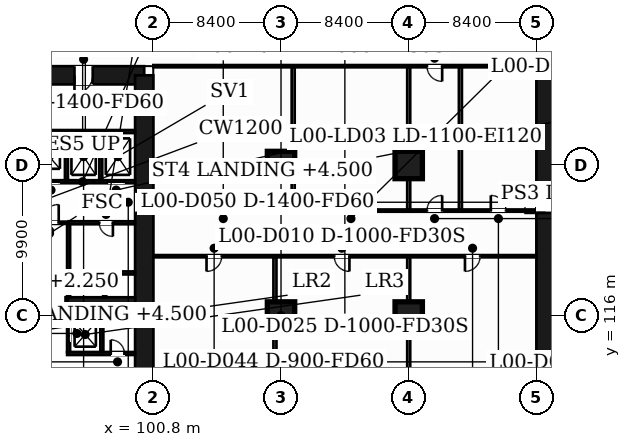
"""IFC4 building model, lengths in metres.
Left out: names, types, materials, properties, quantities, classifications, styles, units other than length and angle.
Written with IfcOpenShell. Run it as: python <this file> out.ifc"""

import sys

from ifc_helpers import new_model, si_unit, direction, frame, frame_2d, origin, origin_2d, place, context, subcontext, project, spatial, rectangle, extrude, element, fill, save


model = new_model("IFC4")
c1 = context("Model", 3, precision=1e-05, world=origin(), true_north=direction((0.0, 1.0)))
c2 = subcontext(c1, "Body", "Model", "MODEL_VIEW")
j1 = project(units=[si_unit("LENGTHUNIT", "METRE"), si_unit("PLANEANGLEUNIT", "RADIAN")], contexts=[c1])
p1 = place(None, origin())
s1 = spatial("IfcSite", under=j1, at=p1, CompositionType="ELEMENT")
p2 = place(p1, origin())
s2 = spatial("IfcBuilding", under=s1, at=p2, CompositionType="ELEMENT")
p3 = place(p2, origin())
s3 = spatial("IfcBuildingStorey", under=s2, at=p3, CompositionType="ELEMENT", Elevation=0.0)
p4 = place(p3, frame((89.156, 131.8, -0.35), z_axis=(0.0, 0.0, 1.0), x_axis=(1.0, 0.0, 0.0)))
e1 = element("IfcWall", 1, at=p4, inside=s3, PredefinedType="SHEAR", context=c2, shape_type="SweptSolid", body=[
    extrude(rectangle(XDim=11.044, YDim=1.2, at=frame_2d((5.522, 0.0))), origin(), (0.0, 0.0, 1.0), 9.35),
])
p5 = place(p4, frame((6.458, 0.0, 0.35)))
e2 = element("IfcOpeningElement", 2, at=p5, cuts=e1, PredefinedType="OPENING", context=c2, shape_type="SweptSolid", body=[
    extrude(rectangle(XDim=1.2, YDim=2.1, at=frame_2d((0.6, 1.05))), frame((0.0, 0.61, 0.0), z_axis=(0.0, -1.0, 0.0), x_axis=(1.0, 0.0, 0.0)), (0.0, 0.0, 1.0), 1.22),
])
p6 = place(p3, frame((100.2, 131.8, -0.35), z_axis=(0.0, 0.0, 1.0), x_axis=(0.0, -1.0, 0.0)))
e3 = element("IfcWall", 3, at=p6, inside=s3, PredefinedType="SHEAR", context=c2, shape_type="SweptSolid", body=[
    extrude(rectangle(XDim=20.8, YDim=1.2, at=frame_2d((10.4, 0.0))), origin(), (0.0, 0.0, 1.0), 9.35),
])
p7 = place(p6, frame((7.65, 0.0, 0.35)))
e4 = element("IfcOpeningElement", 4, at=p7, cuts=e3, PredefinedType="OPENING", context=c2, shape_type="SweptSolid", body=[
    extrude(rectangle(XDim=1.4, YDim=2.1, at=frame_2d((0.7, 1.05))), frame((0.0, 0.61, 0.0), z_axis=(0.0, -1.0, 0.0), x_axis=(1.0, 0.0, 0.0)), (0.0, 0.0, 1.0), 1.22),
])
p8 = place(p3, frame((95.1, 116.6, -0.35), z_axis=(0.0, 0.0, 1.0), x_axis=(1.0, 0.0, 0.0)))
e5 = element("IfcWall", 5, at=p8, inside=s3, PredefinedType="SHEAR", context=c2, shape_type="SweptSolid", body=[
    extrude(rectangle(XDim=4.5, YDim=1.2, at=frame_2d((2.25, 0.0))), origin(), (0.0, 0.0, 1.0), 9.35),
])
p9 = place(p3, frame((126.6, 131.8, -0.35), z_axis=(0.0, 0.0, 1.0), x_axis=(1.0, 0.0, 0.0)))
e6 = element("IfcWall", 6, at=p9, inside=s3, PredefinedType="SHEAR", context=c2, shape_type="SweptSolid", body=[
    extrude(rectangle(XDim=11.044, YDim=1.2, at=frame_2d((5.522, 0.0))), origin(), (0.0, 0.0, 1.0), 9.35),
])
p10 = place(p9, frame((3.386, 0.0, 0.35)))
e7 = element("IfcOpeningElement", 7, at=p10, cuts=e6, PredefinedType="OPENING", context=c2, shape_type="SweptSolid", body=[
    extrude(rectangle(XDim=1.2, YDim=2.1, at=frame_2d((0.6, 1.05))), frame((0.0, 0.61, 0.0), z_axis=(0.0, -1.0, 0.0), x_axis=(1.0, 0.0, 0.0)), (0.0, 0.0, 1.0), 1.22),
])
p11 = place(p3, frame((126.6, 111.0, -0.35), z_axis=(0.0, 0.0, 1.0), x_axis=(0.0, 1.0, 0.0)))
e8 = element("IfcWall", 8, at=p11, inside=s3, PredefinedType="SHEAR", context=c2, shape_type="SweptSolid", body=[
    extrude(rectangle(XDim=20.8, YDim=1.2, at=frame_2d((10.4, 0.0))), origin(), (0.0, 0.0, 1.0), 9.35),
])
p12 = place(p11, frame((11.75, 0.0, 0.35)))
e9 = element("IfcOpeningElement", 9, at=p12, cuts=e8, PredefinedType="OPENING", context=c2, shape_type="SweptSolid", body=[
    extrude(rectangle(XDim=1.4, YDim=2.1, at=frame_2d((0.7, 1.05))), frame((0.0, 0.61, 0.0), z_axis=(0.0, -1.0, 0.0), x_axis=(1.0, 0.0, 0.0)), (0.0, 0.0, 1.0), 1.22),
])
for number, where, z_axis, x_axis in (
    (10, (109.2, 116.0, -0.35), (0.0, 0.0, 1.0), (1.0, 0.0, 0.0)),
    (11, (117.6, 116.0, -0.35), (0.0, 0.0, 1.0), (1.0, 0.0, 0.0)),
    (12, (109.2, 125.9, -0.35), (0.0, 0.0, 1.0), (1.0, 0.0, 0.0)),
    (13, (117.6, 125.9, -0.35), (0.0, 0.0, 1.0), (1.0, 0.0, 0.0)),
):
    element("IfcColumn", number, at=place(p3, frame(where, z_axis=z_axis, x_axis=x_axis)), inside=s3, PredefinedType="COLUMN", context=c2, shape_type="SweptSolid", body=[
        extrude(rectangle(XDim=1.8, YDim=1.8, at=origin_2d()), origin(), (0.0, 0.0, 1.0), 9.35),
    ])
p13 = place(p3, frame((95.127, 113.5, 0.0), z_axis=(0.0, 0.0, 1.0), x_axis=(1.0, 0.0, 0.0)))
e14 = element("IfcWall", 14, at=p13, inside=s3, PredefinedType="PARTITIONING", context=c2, shape_type="SweptSolid", body=[
    extrude(rectangle(XDim=4.473, YDim=0.2, at=frame_2d((2.237, 0.0))), origin(), (0.0, 0.0, 1.0), 8.5),
])
p14 = place(p13, frame((2.871, 0.0, 0.0)))
e15 = element("IfcOpeningElement", 15, at=p14, cuts=e14, PredefinedType="OPENING", context=c2, shape_type="SweptSolid", body=[
    extrude(rectangle(XDim=0.9, YDim=2.1, at=frame_2d((0.45, 1.05))), frame((0.0, 0.11, 0.0), z_axis=(0.0, -1.0, 0.0), x_axis=(1.0, 0.0, 0.0)), (0.0, 0.0, 1.0), 0.22),
])
p15 = place(p3, frame((95.227, 118.8, 0.0), z_axis=(0.0, 0.0, 1.0), x_axis=(1.0, 0.0, 0.0)))
e16 = element("IfcWall", 16, at=p15, inside=s3, PredefinedType="PARTITIONING", context=c2, shape_type="SweptSolid", body=[
    extrude(rectangle(XDim=4.373, YDim=0.2, at=frame_2d((2.187, 0.0))), origin(), (0.0, 0.0, 1.0), 8.5),
])
p16 = place(p3, frame((100.8, 119.9, 0.0), z_axis=(0.0, 0.0, 1.0), x_axis=(1.0, 0.0, 0.0)))
e17 = element("IfcWall", 17, at=p16, inside=s3, PredefinedType="PARTITIONING", context=c2, shape_type="SweptSolid", body=[
    extrude(rectangle(XDim=25.2, YDim=0.15, at=frame_2d((12.6, 0.0))), origin(), (0.0, 0.0, 1.0), 8.5),
])
p17 = place(p16, frame((3.5, 0.0, 0.0)))
e18 = element("IfcOpeningElement", 18, at=p17, cuts=e17, PredefinedType="OPENING", context=c2, shape_type="SweptSolid", body=[
    extrude(rectangle(XDim=1.0, YDim=2.1, at=frame_2d((0.5, 1.05))), frame((0.0, 0.085, 0.0), z_axis=(0.0, -1.0, 0.0), x_axis=(1.0, 0.0, 0.0)), (0.0, 0.0, 1.0), 0.17),
])
p18 = place(p16, frame((11.9, 0.0, 0.0)))
e19 = element("IfcOpeningElement", 19, at=p18, cuts=e17, PredefinedType="OPENING", context=c2, shape_type="SweptSolid", body=[
    extrude(rectangle(XDim=1.0, YDim=2.1, at=frame_2d((0.5, 1.05))), frame((0.0, 0.085, 0.0), z_axis=(0.0, -1.0, 0.0), x_axis=(1.0, 0.0, 0.0)), (0.0, 0.0, 1.0), 0.17),
])
p19 = place(p16, frame((20.5, 0.0, 0.0)))
e20 = element("IfcOpeningElement", 20, at=p19, cuts=e17, PredefinedType="OPENING", context=c2, shape_type="SweptSolid", body=[
    extrude(rectangle(XDim=1.0, YDim=2.1, at=frame_2d((0.5, 1.05))), frame((0.0, 0.085, 0.0), z_axis=(0.0, -1.0, 0.0), x_axis=(1.0, 0.0, 0.0)), (0.0, 0.0, 1.0), 0.17),
])
p20 = place(p3, frame((95.227, 122.1, 0.0), z_axis=(0.0, 0.0, 1.0), x_axis=(1.0, 0.0, 0.0)))
e21 = element("IfcWall", 21, at=p20, inside=s3, PredefinedType="PARTITIONING", context=c2, shape_type="SweptSolid", body=[
    extrude(rectangle(XDim=4.373, YDim=0.2, at=frame_2d((2.187, 0.0))), origin(), (0.0, 0.0, 1.0), 8.5),
])
p21 = place(p20, frame((2.014, 0.0, 0.0)))
e22 = element("IfcOpeningElement", 22, at=p21, cuts=e21, PredefinedType="OPENING", context=c2, shape_type="SweptSolid", body=[
    extrude(rectangle(XDim=0.9, YDim=2.1, at=frame_2d((0.45, 1.05))), frame((0.0, 0.11, 0.0), z_axis=(0.0, -1.0, 0.0), x_axis=(1.0, 0.0, 0.0)), (0.0, 0.0, 1.0), 0.22),
])
p22 = place(p3, frame((92.827, 122.1, 0.0), z_axis=(0.0, 0.0, 1.0), x_axis=(1.0, 0.0, 0.0)))
e23 = element("IfcWall", 23, at=p22, inside=s3, PredefinedType="PARTITIONING", context=c2, shape_type="SweptSolid", body=[
    extrude(rectangle(XDim=2.4, YDim=0.15, at=frame_2d((1.2, 0.0))), origin(), (0.0, 0.0, 1.0), 8.5),
])
p23 = place(p22, frame((0.55, 0.0, 0.0)))
e24 = element("IfcOpeningElement", 24, at=p23, cuts=e23, PredefinedType="OPENING", context=c2, shape_type="SweptSolid", body=[
    extrude(rectangle(XDim=1.2, YDim=2.1, at=frame_2d((0.6, 1.05))), frame((0.0, 0.085, 0.0), z_axis=(0.0, -1.0, 0.0), x_axis=(1.0, 0.0, 0.0)), (0.0, 0.0, 1.0), 0.17),
])
p24 = place(p3, frame((100.8, 122.9, 0.0), z_axis=(0.0, 0.0, 1.0), x_axis=(1.0, 0.0, 0.0)))
e25 = element("IfcWall", 25, at=p24, inside=s3, PredefinedType="PARTITIONING", context=c2, shape_type="SweptSolid", body=[
    extrude(rectangle(XDim=25.2, YDim=0.15, at=frame_2d((12.6, 0.0))), origin(), (0.0, 0.0, 1.0), 8.5),
])
p25 = place(p24, frame((4.1, 0.0, 0.0)))
e26 = element("IfcOpeningElement", 26, at=p25, cuts=e25, PredefinedType="OPENING", context=c2, shape_type="SweptSolid", body=[
    extrude(rectangle(XDim=1.0, YDim=2.1, at=frame_2d((0.5, 1.05))), frame((0.0, 0.085, 0.0), z_axis=(0.0, -1.0, 0.0), x_axis=(1.0, 0.0, 0.0)), (0.0, 0.0, 1.0), 0.17),
])
p26 = place(p24, frame((12.5, 0.0, 0.0)))
e27 = element("IfcOpeningElement", 27, at=p26, cuts=e25, PredefinedType="OPENING", context=c2, shape_type="SweptSolid", body=[
    extrude(rectangle(XDim=1.0, YDim=2.1, at=frame_2d((0.5, 1.05))), frame((0.0, 0.085, 0.0), z_axis=(0.0, -1.0, 0.0), x_axis=(1.0, 0.0, 0.0)), (0.0, 0.0, 1.0), 0.17),
])
p27 = place(p24, frame((18.0, 0.0, 0.0)))
e28 = element("IfcOpeningElement", 28, at=p27, cuts=e25, PredefinedType="OPENING", context=c2, shape_type="SweptSolid", body=[
    extrude(rectangle(XDim=1.0, YDim=2.1, at=frame_2d((0.5, 1.05))), frame((0.0, 0.085, 0.0), z_axis=(0.0, -1.0, 0.0), x_axis=(1.0, 0.0, 0.0)), (0.0, 0.0, 1.0), 0.17),
])
p28 = place(p24, frame((22.2, 0.0, 0.0)))
e29 = element("IfcOpeningElement", 29, at=p28, cuts=e25, PredefinedType="OPENING", context=c2, shape_type="SweptSolid", body=[
    extrude(rectangle(XDim=1.0, YDim=2.1, at=frame_2d((0.5, 1.05))), frame((0.0, 0.085, 0.0), z_axis=(0.0, -1.0, 0.0), x_axis=(1.0, 0.0, 0.0)), (0.0, 0.0, 1.0), 0.17),
])
p29 = place(p3, frame((92.702, 124.8, 0.0), z_axis=(0.0, 0.0, 1.0), x_axis=(1.0, 0.0, 0.0)))
e30 = element("IfcWall", 30, at=p29, inside=s3, PredefinedType="PARTITIONING", context=c2, shape_type="SweptSolid", body=[
    extrude(rectangle(XDim=6.898, YDim=0.2, at=frame_2d((3.449, 0.0))), origin(), (0.0, 0.0, 1.0), 8.5),
])
p30 = place(p29, frame((0.818, 0.0, 0.0)))
e31 = element("IfcOpeningElement", 31, at=p30, cuts=e30, PredefinedType="OPENING", context=c2, shape_type="SweptSolid", body=[
    extrude(rectangle(XDim=1.1, YDim=2.1, at=frame_2d((0.55, 1.05))), frame((0.0, 0.11, 0.0), z_axis=(0.0, -1.0, 0.0), x_axis=(1.0, 0.0, 0.0)), (0.0, 0.0, 1.0), 0.22),
])
p31 = place(p29, frame((5.105, 0.0, 0.0)))
e32 = element("IfcOpeningElement", 32, at=p31, cuts=e30, PredefinedType="OPENING", context=c2, shape_type="SweptSolid", body=[
    extrude(rectangle(XDim=1.1, YDim=2.1, at=frame_2d((0.55, 1.05))), frame((0.0, 0.11, 0.0), z_axis=(0.0, -1.0, 0.0), x_axis=(1.0, 0.0, 0.0)), (0.0, 0.0, 1.0), 0.22),
])
p32 = place(p3, frame((117.6, 127.9, 0.0), z_axis=(0.0, 0.0, 1.0), x_axis=(1.0, 0.0, 0.0)))
e33 = element("IfcWall", 33, at=p32, inside=s3, PredefinedType="PARTITIONING", context=c2, shape_type="SweptSolid", body=[
    extrude(rectangle(XDim=3.4, YDim=0.2, at=frame_2d((1.7, 0.0))), origin(), (0.0, 0.0, 1.0), 8.5),
])
p33 = place(p3, frame((92.827, 128.1, 0.0), z_axis=(0.0, 0.0, 1.0), x_axis=(1.0, 0.0, 0.0)))
e34 = element("IfcWall", 34, at=p33, inside=s3, PredefinedType="PARTITIONING", context=c2, shape_type="SweptSolid", body=[
    extrude(rectangle(XDim=6.773, YDim=0.2, at=frame_2d((3.387, 0.0))), origin(), (0.0, 0.0, 1.0), 8.5),
])
p34 = place(p33, frame((2.951, 0.0, 0.0)))
e35 = element("IfcOpeningElement", 35, at=p34, cuts=e34, PredefinedType="OPENING", context=c2, shape_type="SweptSolid", body=[
    extrude(rectangle(XDim=1.1, YDim=2.1, at=frame_2d((0.55, 1.05))), frame((0.0, 0.11, 0.0), z_axis=(0.0, -1.0, 0.0), x_axis=(1.0, 0.0, 0.0)), (0.0, 0.0, 1.0), 0.22),
])
p35 = place(p3, frame((100.8, 132.4, 0.0), z_axis=(0.0, 0.0, 1.0), x_axis=(1.0, 0.0, 0.0)))
e36 = element("IfcWall", 36, at=p35, inside=s3, PredefinedType="PARTITIONING", context=c2, shape_type="SweptSolid", body=[
    extrude(rectangle(XDim=25.2, YDim=0.15, at=frame_2d((12.6, 0.0))), origin(), (0.0, 0.0, 1.0), 8.5),
])
p36 = place(p35, frame((18.0, 0.0, 0.0)))
e37 = element("IfcOpeningElement", 37, at=p36, cuts=e36, PredefinedType="OPENING", context=c2, shape_type="SweptSolid", body=[
    extrude(rectangle(XDim=1.0, YDim=2.1, at=frame_2d((0.5, 1.05))), frame((0.0, 0.085, 0.0), z_axis=(0.0, -1.0, 0.0), x_axis=(1.0, 0.0, 0.0)), (0.0, 0.0, 1.0), 0.17),
])
p37 = place(p3, frame((95.085, 124.9, 0.0), z_axis=(0.0, 0.0, 1.0), x_axis=(0.0, 1.0, 0.0)))
e38 = element("IfcWall", 38, at=p37, inside=s3, PredefinedType="PARTITIONING", context=c2, shape_type="SweptSolid", body=[
    extrude(rectangle(XDim=3.1, YDim=0.2, at=frame_2d((1.55, 0.0))), origin(), (0.0, 0.0, 1.0), 8.5),
])
p38 = place(p3, frame((95.1, 116.0, 0.0), z_axis=(0.0, 0.0, 1.0), x_axis=(0.0, 1.0, 0.0)))
e39 = element("IfcWall", 39, at=p38, inside=s3, PredefinedType="PARTITIONING", context=c2, shape_type="SweptSolid", body=[
    extrude(rectangle(XDim=1.2, YDim=0.15, at=frame_2d((0.6, 0.0))), origin(), (0.0, 0.0, 1.0), 8.5),
])
p39 = place(p3, frame((95.227, 113.6, 0.0), z_axis=(0.0, 0.0, 1.0), x_axis=(0.0, 1.0, 0.0)))
e40 = element("IfcWall", 40, at=p39, inside=s3, PredefinedType="PARTITIONING", context=c2, shape_type="SweptSolid", body=[
    extrude(rectangle(XDim=2.4, YDim=0.2, at=frame_2d((1.2, 0.0))), origin(), (0.0, 0.0, 1.0), 8.5),
])
p40 = place(p39, frame((0.67, 0.0, 0.0)))
e41 = element("IfcOpeningElement", 41, at=p40, cuts=e40, PredefinedType="OPENING", context=c2, shape_type="SweptSolid", body=[
    extrude(rectangle(XDim=1.1, YDim=2.1, at=frame_2d((0.55, 1.05))), frame((0.0, 0.11, 0.0), z_axis=(0.0, -1.0, 0.0), x_axis=(1.0, 0.0, 0.0)), (0.0, 0.0, 1.0), 0.22),
])
p41 = place(p3, frame((95.227, 117.2, 0.0), z_axis=(0.0, 0.0, 1.0), x_axis=(0.0, 1.0, 0.0)))
e42 = element("IfcWall", 42, at=p41, inside=s3, PredefinedType="PARTITIONING", context=c2, shape_type="SweptSolid", body=[
    extrude(rectangle(XDim=4.8, YDim=0.2, at=frame_2d((2.4, 0.0))), origin(), (0.0, 0.0, 1.0), 8.5),
])
p42 = place(p41, frame((0.35, 0.0, 0.0)))
e43 = element("IfcOpeningElement", 43, at=p42, cuts=e42, PredefinedType="OPENING", context=c2, shape_type="SweptSolid", body=[
    extrude(rectangle(XDim=0.9, YDim=2.1, at=frame_2d((0.45, 1.05))), frame((0.0, 0.11, 0.0), z_axis=(0.0, -1.0, 0.0), x_axis=(1.0, 0.0, 0.0)), (0.0, 0.0, 1.0), 0.22),
])
p43 = place(p3, frame((97.342, 124.9, 0.0), z_axis=(0.0, 0.0, 1.0), x_axis=(0.0, 1.0, 0.0)))
e44 = element("IfcWall", 44, at=p43, inside=s3, PredefinedType="PARTITIONING", context=c2, shape_type="SweptSolid", body=[
    extrude(rectangle(XDim=3.1, YDim=0.2, at=frame_2d((1.55, 0.0))), origin(), (0.0, 0.0, 1.0), 8.5),
])
p44 = place(p3, frame((97.414, 113.6, 0.0), z_axis=(0.0, 0.0, 1.0), x_axis=(0.0, 1.0, 0.0)))
e45 = element("IfcWall", 45, at=p44, inside=s3, PredefinedType="PARTITIONING", context=c2, shape_type="SweptSolid", body=[
    extrude(rectangle(XDim=2.4, YDim=0.2, at=frame_2d((1.2, 0.0))), origin(), (0.0, 0.0, 1.0), 8.5),
])
p45 = place(p3, frame((97.6, 117.2, 0.0), z_axis=(0.0, 0.0, 1.0), x_axis=(0.0, 1.0, 0.0)))
e46 = element("IfcWall", 46, at=p45, inside=s3, PredefinedType="PARTITIONING", context=c2, shape_type="SweptSolid", body=[
    extrude(rectangle(XDim=1.5, YDim=0.2, at=frame_2d((0.75, 0.0))), origin(), (0.0, 0.0, 1.0), 8.5),
])
for number, where, z_axis, x_axis in (
    (47, (108.8, 110.475, 0.0), (0.0, 0.0, 1.0), (0.0, 1.0, 0.0)),
    (48, (110.0, 122.975, 0.0), (0.0, 0.0, 1.0), (0.0, 1.0, 0.0)),
    (49, (117.6, 110.475, 0.0), (0.0, 0.0, 1.0), (0.0, 1.0, 0.0)),
    (50, (117.6, 122.975, 0.0), (0.0, 0.0, 1.0), (0.0, 1.0, 0.0)),
    (51, (121.0, 122.975, 0.0), (0.0, 0.0, 1.0), (0.0, 1.0, 0.0)),
):
    element("IfcWall", number, at=place(p3, frame(where, z_axis=z_axis, x_axis=x_axis)), inside=s3, PredefinedType="PARTITIONING", context=c2, shape_type="SweptSolid", body=[
        extrude(rectangle(XDim=9.35, YDim=0.2, at=frame_2d((4.675, 0.0))), origin(), (0.0, 0.0, 1.0), 8.5),
    ])
p46 = place(p17, origin())
e52 = element("IfcDoor", 52, at=p46, inside=s3, OperationType="SINGLE_SWING_LEFT", PredefinedType="DOOR", context=c2, shape_type="SweptSolid", body=[
    extrude(rectangle(XDim=1.0, YDim=2.1, at=frame_2d((0.5, 1.05))), frame((0.0, 0.025, 0.0), z_axis=(0.0, -1.0, 0.0), x_axis=(1.0, 0.0, 0.0)), (0.0, 0.0, 1.0), 0.05),
])
fill(e18, e52)
p47 = place(p18, origin())
e53 = element("IfcDoor", 53, at=p47, inside=s3, OperationType="SINGLE_SWING_RIGHT", PredefinedType="DOOR", context=c2, shape_type="SweptSolid", body=[
    extrude(rectangle(XDim=1.0, YDim=2.1, at=frame_2d((0.5, 1.05))), frame((0.0, 0.025, 0.0), z_axis=(0.0, -1.0, 0.0), x_axis=(1.0, 0.0, 0.0)), (0.0, 0.0, 1.0), 0.05),
])
fill(e19, e53)
p48 = place(p19, origin())
e54 = element("IfcDoor", 54, at=p48, inside=s3, OperationType="SINGLE_SWING_LEFT", PredefinedType="DOOR", context=c2, shape_type="SweptSolid", body=[
    extrude(rectangle(XDim=1.0, YDim=2.1, at=frame_2d((0.5, 1.05))), frame((0.0, 0.025, 0.0), z_axis=(0.0, -1.0, 0.0), x_axis=(1.0, 0.0, 0.0)), (0.0, 0.0, 1.0), 0.05),
])
fill(e20, e54)
p49 = place(p25, origin())
e55 = element("IfcDoor", 55, at=p49, inside=s3, OperationType="SINGLE_SWING_RIGHT", PredefinedType="DOOR", context=c2, shape_type="SweptSolid", body=[
    extrude(rectangle(XDim=1.0, YDim=2.1, at=frame_2d((0.5, 1.05))), frame((0.0, 0.025, 0.0), z_axis=(0.0, -1.0, 0.0), x_axis=(1.0, 0.0, 0.0)), (0.0, 0.0, 1.0), 0.05),
])
fill(e26, e55)
p50 = place(p26, origin())
e56 = element("IfcDoor", 56, at=p50, inside=s3, OperationType="SINGLE_SWING_LEFT", PredefinedType="DOOR", context=c2, shape_type="SweptSolid", body=[
    extrude(rectangle(XDim=1.0, YDim=2.1, at=frame_2d((0.5, 1.05))), frame((0.0, 0.025, 0.0), z_axis=(0.0, -1.0, 0.0), x_axis=(1.0, 0.0, 0.0)), (0.0, 0.0, 1.0), 0.05),
])
fill(e27, e56)
p51 = place(p27, origin())
e57 = element("IfcDoor", 57, at=p51, inside=s3, OperationType="SINGLE_SWING_RIGHT", PredefinedType="DOOR", context=c2, shape_type="SweptSolid", body=[
    extrude(rectangle(XDim=1.0, YDim=2.1, at=frame_2d((0.5, 1.05))), frame((0.0, 0.025, 0.0), z_axis=(0.0, -1.0, 0.0), x_axis=(1.0, 0.0, 0.0)), (0.0, 0.0, 1.0), 0.05),
])
fill(e28, e57)
p52 = place(p28, origin())
e58 = element("IfcDoor", 58, at=p52, inside=s3, OperationType="SINGLE_SWING_LEFT", PredefinedType="DOOR", context=c2, shape_type="SweptSolid", body=[
    extrude(rectangle(XDim=1.0, YDim=2.1, at=frame_2d((0.5, 1.05))), frame((0.0, 0.025, 0.0), z_axis=(0.0, -1.0, 0.0), x_axis=(1.0, 0.0, 0.0)), (0.0, 0.0, 1.0), 0.05),
])
fill(e29, e58)
p53 = place(p36, origin())
e59 = element("IfcDoor", 59, at=p53, inside=s3, OperationType="SINGLE_SWING_RIGHT", PredefinedType="DOOR", context=c2, shape_type="SweptSolid", body=[
    extrude(rectangle(XDim=1.0, YDim=2.1, at=frame_2d((0.5, 1.05))), frame((0.0, 0.025, 0.0), z_axis=(0.0, -1.0, 0.0), x_axis=(1.0, 0.0, 0.0)), (0.0, 0.0, 1.0), 0.05),
])
fill(e37, e59)
p54 = place(p23, origin())
e60 = element("IfcDoor", 60, at=p54, inside=s3, OperationType="SINGLE_SWING_RIGHT", PredefinedType="DOOR", context=c2, shape_type="SweptSolid", body=[
    extrude(rectangle(XDim=1.2, YDim=2.1, at=frame_2d((0.6, 1.05))), frame((0.0, 0.025, 0.0), z_axis=(0.0, -1.0, 0.0), x_axis=(1.0, 0.0, 0.0)), (0.0, 0.0, 1.0), 0.05),
])
fill(e24, e60)
p55 = place(p30, origin())
e61 = element("IfcDoor", 61, at=p55, inside=s3, OperationType="SLIDING_TO_LEFT", PredefinedType="DOOR", context=c2, shape_type="SweptSolid", body=[
    extrude(rectangle(XDim=1.1, YDim=2.1, at=frame_2d((0.55, 1.05))), frame((0.0, 0.025, 0.0), z_axis=(0.0, -1.0, 0.0), x_axis=(1.0, 0.0, 0.0)), (0.0, 0.0, 1.0), 0.05),
])
fill(e31, e61)
p56 = place(p34, origin())
e62 = element("IfcDoor", 62, at=p56, inside=s3, OperationType="SLIDING_TO_LEFT", PredefinedType="DOOR", context=c2, shape_type="SweptSolid", body=[
    extrude(rectangle(XDim=1.1, YDim=2.1, at=frame_2d((0.55, 1.05))), frame((0.0, 0.025, 0.0), z_axis=(0.0, -1.0, 0.0), x_axis=(1.0, 0.0, 0.0)), (0.0, 0.0, 1.0), 0.05),
])
fill(e35, e62)
p57 = place(p31, origin())
e63 = element("IfcDoor", 63, at=p57, inside=s3, OperationType="SLIDING_TO_LEFT", PredefinedType="DOOR", context=c2, shape_type="SweptSolid", body=[
    extrude(rectangle(XDim=1.1, YDim=2.1, at=frame_2d((0.55, 1.05))), frame((0.0, 0.025, 0.0), z_axis=(0.0, -1.0, 0.0), x_axis=(1.0, 0.0, 0.0)), (0.0, 0.0, 1.0), 0.05),
])
fill(e32, e63)
p58 = place(p21, origin())
e64 = element("IfcDoor", 64, at=p58, inside=s3, OperationType="SINGLE_SWING_RIGHT", PredefinedType="DOOR", context=c2, shape_type="SweptSolid", body=[
    extrude(rectangle(XDim=0.9, YDim=2.1, at=frame_2d((0.45, 1.05))), frame((0.0, 0.025, 0.0), z_axis=(0.0, -1.0, 0.0), x_axis=(1.0, 0.0, 0.0)), (0.0, 0.0, 1.0), 0.05),
])
fill(e22, e64)
p59 = place(p42, origin())
e65 = element("IfcDoor", 65, at=p59, inside=s3, OperationType="SINGLE_SWING_LEFT", PredefinedType="DOOR", context=c2, shape_type="SweptSolid", body=[
    extrude(rectangle(XDim=0.9, YDim=2.1, at=frame_2d((0.45, 1.05))), frame((0.0, 0.025, 0.0), z_axis=(0.0, -1.0, 0.0), x_axis=(1.0, 0.0, 0.0)), (0.0, 0.0, 1.0), 0.05),
])
fill(e43, e65)
p60 = place(p40, origin())
e66 = element("IfcDoor", 66, at=p60, inside=s3, OperationType="SLIDING_TO_LEFT", PredefinedType="DOOR", context=c2, shape_type="SweptSolid", body=[
    extrude(rectangle(XDim=1.1, YDim=2.1, at=frame_2d((0.55, 1.05))), frame((0.0, 0.025, 0.0), z_axis=(0.0, -1.0, 0.0), x_axis=(1.0, 0.0, 0.0)), (0.0, 0.0, 1.0), 0.05),
])
fill(e41, e66)
p61 = place(p14, origin())
e67 = element("IfcDoor", 67, at=p61, inside=s3, OperationType="SINGLE_SWING_LEFT", PredefinedType="DOOR", context=c2, shape_type="SweptSolid", body=[
    extrude(rectangle(XDim=0.9, YDim=2.1, at=frame_2d((0.45, 1.05))), frame((0.0, 0.025, 0.0), z_axis=(0.0, -1.0, 0.0), x_axis=(1.0, 0.0, 0.0)), (0.0, 0.0, 1.0), 0.05),
])
fill(e15, e67)
p62 = place(p5, origin())
e68 = element("IfcDoor", 68, at=p62, inside=s3, OperationType="SINGLE_SWING_LEFT", PredefinedType="DOOR", context=c2, shape_type="SweptSolid", body=[
    extrude(rectangle(XDim=1.2, YDim=2.1, at=frame_2d((0.6, 1.05))), frame((0.0, 0.025, 0.0), z_axis=(0.0, -1.0, 0.0), x_axis=(1.0, 0.0, 0.0)), (0.0, 0.0, 1.0), 0.05),
])
fill(e2, e68)
p63 = place(p7, origin())
e69 = element("IfcDoor", 69, at=p63, inside=s3, OperationType="SINGLE_SWING_RIGHT", PredefinedType="DOOR", context=c2, shape_type="SweptSolid", body=[
    extrude(rectangle(XDim=1.4, YDim=2.1, at=frame_2d((0.7, 1.05))), frame((0.0, 0.025, 0.0), z_axis=(0.0, -1.0, 0.0), x_axis=(1.0, 0.0, 0.0)), (0.0, 0.0, 1.0), 0.05),
])
fill(e4, e69)
p64 = place(p12, origin())
e70 = element("IfcDoor", 70, at=p64, inside=s3, OperationType="SINGLE_SWING_LEFT", PredefinedType="DOOR", context=c2, shape_type="SweptSolid", body=[
    extrude(rectangle(XDim=1.4, YDim=2.1, at=frame_2d((0.7, 1.05))), frame((0.0, 0.025, 0.0), z_axis=(0.0, -1.0, 0.0), x_axis=(1.0, 0.0, 0.0)), (0.0, 0.0, 1.0), 0.05),
])
fill(e9, e70)
save(model, sys.argv[1])
